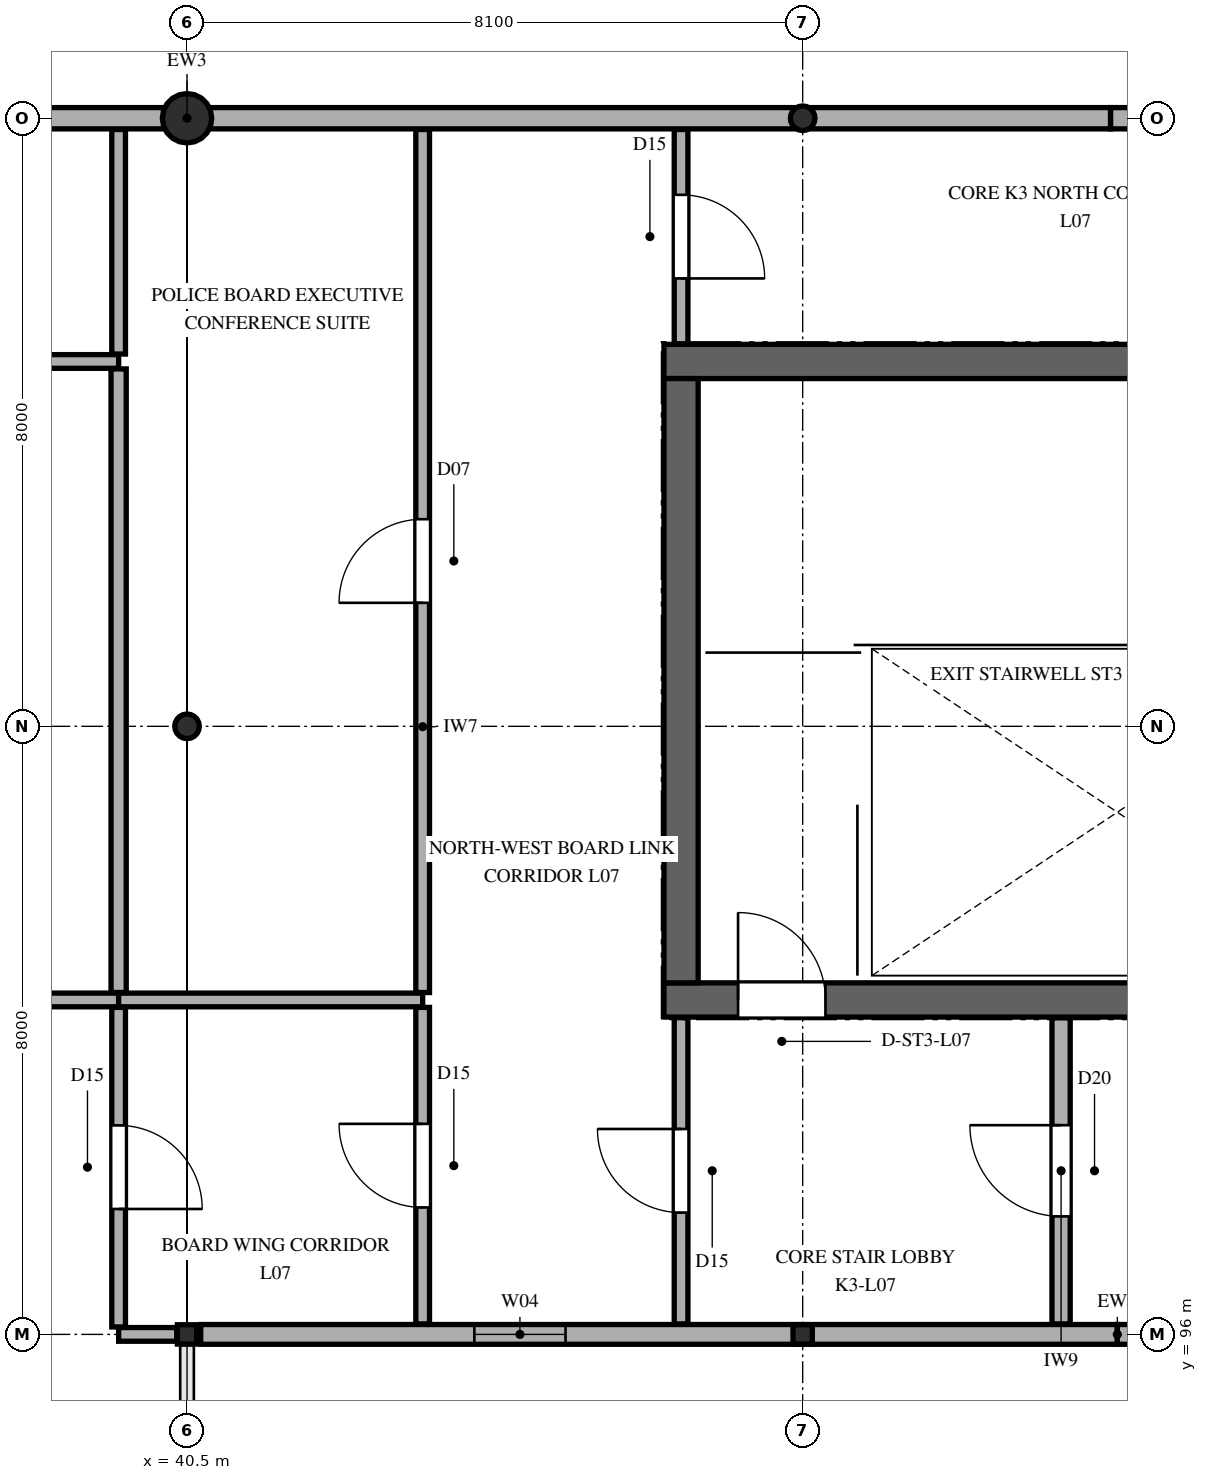
"""IFC4 building model, lengths in metres.
Left out: names, types, materials, properties, quantities, classifications, styles, units other than length and angle.
Written with IfcOpenShell. Run it as: python <this file> out.ifc"""

import sys

from ifc_helpers import new_model, si_unit, direction, frame, frame_2d, origin, origin_2d, place, context, subcontext, project, spatial, rectangle, hollow_rectangle, circle, hollow_circle, extrude, element, fill, save


model = new_model("IFC4")
c1 = context("Model", 3, precision=1e-05, world=origin(), true_north=direction((0.0, 1.0)))
c2 = subcontext(c1, "Body", "Model", "MODEL_VIEW")
j1 = project(units=[si_unit("LENGTHUNIT", "METRE"), si_unit("PLANEANGLEUNIT", "RADIAN")], contexts=[c1])
p1 = place(None, origin())
s1 = spatial("IfcSite", under=j1, at=p1, CompositionType="ELEMENT")
p2 = place(p1, origin())
s2 = spatial("IfcBuilding", under=s1, at=p2, CompositionType="ELEMENT")
p3 = place(p2, frame((0.0, 0.0, 33.3)))
s3 = spatial("IfcBuildingStorey", under=s2, at=p3, CompositionType="ELEMENT", Elevation=33.3)
p4 = place(p3, frame((46.775, 100.4, 0.0), z_axis=(0.0, 0.0, 1.0), x_axis=(1.0, 0.0, 0.0)))
e1 = element("IfcWall", 1, at=p4, inside=s3, PredefinedType="SHEAR", context=c2, shape_type="SweptSolid", body=[
    extrude(rectangle(XDim=15.25, YDim=0.45, at=frame_2d((7.625, 0.0))), origin(), (0.0, 0.0, 1.0), 3.98),
])
p5 = place(p4, frame((0.975, 0.0, 0.0)))
e2 = element("IfcOpeningElement", 2, at=p5, cuts=e1, PredefinedType="OPENING", context=c2, shape_type="SweptSolid", body=[
    extrude(rectangle(XDim=1.15, YDim=2.25, at=frame_2d((0.575, 1.125))), frame((0.0, 0.235, 0.0), z_axis=(0.0, -1.0, 0.0), x_axis=(1.0, 0.0, 0.0)), (0.0, 0.0, 1.0), 0.47),
])
p6 = place(p4, frame((10.258, 0.0, 0.0)))
e3 = element("IfcOpeningElement", 3, at=p6, cuts=e1, PredefinedType="OPENING", context=c2, shape_type="SweptSolid", body=[
    extrude(rectangle(XDim=1.1, YDim=2.2, at=frame_2d((0.55, 1.1))), frame((0.0, 0.235, 0.0), z_axis=(0.0, -1.0, 0.0), x_axis=(1.0, 0.0, 0.0)), (0.0, 0.0, 1.0), 0.47),
])
p7 = place(p3, frame((46.775, 108.8, 0.0), z_axis=(0.0, 0.0, 1.0), x_axis=(1.0, 0.0, 0.0)))
e4 = element("IfcWall", 4, at=p7, inside=s3, PredefinedType="SHEAR", context=c2, shape_type="SweptSolid", body=[
    extrude(rectangle(XDim=15.25, YDim=0.45, at=frame_2d((7.625, 0.0))), origin(), (0.0, 0.0, 1.0), 3.98),
])
p8 = place(p3, frame((47.0, 100.625, 0.0), z_axis=(0.0, 0.0, 1.0), x_axis=(0.0, 1.0, 0.0)))
e5 = element("IfcWall", 5, at=p8, inside=s3, PredefinedType="SHEAR", context=c2, shape_type="SweptSolid", body=[
    extrude(rectangle(XDim=7.95, YDim=0.45, at=frame_2d((3.975, 0.0))), origin(), (0.0, 0.0, 1.0), 3.98),
])
p9 = place(p3, frame((40.5, 96.0, 0.0), z_axis=(0.0, 0.0, 1.0), x_axis=(1.0, 0.0, 0.0)))
e6 = element("IfcColumn", 6, at=p9, inside=s3, PredefinedType="COLUMN", context=c2, shape_type="SweptSolid", body=[
    extrude(hollow_rectangle(XDim=0.254, YDim=0.254, WallThickness=0.013, InnerFilletRadius=0.013, OuterFilletRadius=0.025, at=origin_2d()), origin(), (0.0, 0.0, 1.0), 3.98),
])
p10 = place(p3, frame((40.5, 104.0, 0.0), z_axis=(0.0, 0.0, 1.0), x_axis=(1.0, 0.0, 0.0)))
e7 = element("IfcColumn", 7, at=p10, inside=s3, PredefinedType="COLUMN", context=c2, shape_type="SweptSolid", body=[
    extrude(hollow_circle(Radius=0.162, WallThickness=0.013, at=origin_2d()), origin(), (0.0, 0.0, 1.0), 3.98),
])
p11 = place(p3, frame((40.5, 112.0, 0.0), z_axis=(0.0, 0.0, 1.0), x_axis=(1.0, 0.0, 0.0)))
e8 = element("IfcColumn", 8, at=p11, inside=s3, PredefinedType="COLUMN", context=c2, shape_type="SweptSolid", body=[
    extrude(circle(Radius=0.325, at=origin_2d()), origin(), (0.0, 0.0, 1.0), 3.98),
])
p12 = place(p3, frame((48.6, 96.0, 0.0), z_axis=(0.0, 0.0, 1.0), x_axis=(1.0, 0.0, 0.0)))
e9 = element("IfcColumn", 9, at=p12, inside=s3, PredefinedType="COLUMN", context=c2, shape_type="SweptSolid", body=[
    extrude(hollow_rectangle(XDim=0.254, YDim=0.254, WallThickness=0.013, InnerFilletRadius=0.013, OuterFilletRadius=0.025, at=origin_2d()), origin(), (0.0, 0.0, 1.0), 3.98),
])
p13 = place(p3, frame((48.6, 112.0, 0.0), z_axis=(0.0, 0.0, 1.0), x_axis=(1.0, 0.0, 0.0)))
e10 = element("IfcColumn", 10, at=p13, inside=s3, PredefinedType="COLUMN", context=c2, shape_type="SweptSolid", body=[
    extrude(hollow_circle(Radius=0.162, WallThickness=0.013, at=origin_2d()), origin(), (0.0, 0.0, 1.0), 3.98),
])
p14 = place(p3, frame((40.68, 96.0, 0.0), z_axis=(0.0, 0.0, 1.0), x_axis=(1.0, 0.0, 0.0)))
e11 = element("IfcWall", 11, at=p14, inside=s3, PredefinedType="SOLIDWALL", context=c2, shape_type="SweptSolid", body=[
    extrude(rectangle(XDim=12.06, YDim=0.26, at=frame_2d((6.03, 0.0))), origin(), (0.0, 0.0, 1.0), 3.655),
])
p15 = place(p14, frame((3.6, 0.0, 0.95)))
e12 = element("IfcOpeningElement", 12, at=p15, cuts=e11, PredefinedType="OPENING", context=c2, shape_type="SweptSolid", body=[
    extrude(rectangle(XDim=1.2, YDim=1.8, at=frame_2d((0.6, 0.9))), frame((0.0, 0.14, 0.0), z_axis=(0.0, -1.0, 0.0), x_axis=(1.0, 0.0, 0.0)), (0.0, 0.0, 1.0), 0.28),
])
p16 = place(p3, frame((52.74, 96.0, 0.0), z_axis=(0.0, 0.0, 1.0), x_axis=(1.0, 0.0, 0.0)))
e13 = element("IfcWall", 13, at=p16, inside=s3, PredefinedType="SOLIDWALL", context=c2, shape_type="SweptSolid", body=[
    extrude(rectangle(XDim=12.06, YDim=0.26, at=frame_2d((6.03, 0.0))), origin(), (0.0, 0.0, 1.0), 3.655),
])
p17 = place(p3, frame((64.8, 112.0, 0.0), z_axis=(0.0, 0.0, 1.0), x_axis=(-1.0, 0.0, 0.0)))
e14 = element("IfcWall", 14, at=p17, inside=s3, PredefinedType="SOLIDWALL", context=c2, shape_type="SweptSolid", body=[
    extrude(rectangle(XDim=12.15, YDim=0.28, at=frame_2d((6.075, 0.0))), origin(), (0.0, 0.0, 1.0), 3.655),
])
p18 = place(p17, frame((5.4, 0.0, 0.95)))
e15 = element("IfcOpeningElement", 15, at=p18, cuts=e14, PredefinedType="OPENING", context=c2, shape_type="SweptSolid", body=[
    extrude(rectangle(XDim=1.35, YDim=1.8, at=frame_2d((0.675, 0.9))), frame((0.0, 0.15, 0.0), z_axis=(0.0, -1.0, 0.0), x_axis=(1.0, 0.0, 0.0)), (0.0, 0.0, 1.0), 0.3),
])
p19 = place(p3, frame((52.65, 112.0, 0.0), z_axis=(0.0, 0.0, 1.0), x_axis=(-1.0, 0.0, 0.0)))
e16 = element("IfcWall", 16, at=p19, inside=s3, PredefinedType="SOLIDWALL", context=c2, shape_type="SweptSolid", body=[
    extrude(rectangle(XDim=12.15, YDim=0.28, at=frame_2d((6.075, 0.0))), origin(), (0.0, 0.0, 1.0), 3.655),
])
p20 = place(p3, frame((40.5, 112.0, 0.0), z_axis=(0.0, 0.0, 1.0), x_axis=(-1.0, 0.0, 0.0)))
e17 = element("IfcWall", 17, at=p20, inside=s3, PredefinedType="SOLIDWALL", context=c2, shape_type="SweptSolid", body=[
    extrude(rectangle(XDim=12.15, YDim=0.28, at=frame_2d((6.075, 0.0))), origin(), (0.0, 0.0, 1.0), 3.655),
])
p21 = place(p20, frame((3.6, 0.0, 0.85)))
e18 = element("IfcOpeningElement", 18, at=p21, cuts=e17, PredefinedType="OPENING", context=c2, shape_type="SweptSolid", body=[
    extrude(rectangle(XDim=1.35, YDim=2.1, at=frame_2d((0.675, 1.05))), frame((0.0, 0.15, 0.0), z_axis=(0.0, -1.0, 0.0), x_axis=(1.0, 0.0, 0.0)), (0.0, 0.0, 1.0), 0.3),
])
p22 = place(p3, frame((34.4, 108.8, 0.0), z_axis=(0.0, 0.0, 1.0), x_axis=(1.0, 0.0, 0.0)))
e19 = element("IfcWall", 19, at=p22, inside=s3, PredefinedType="PARTITIONING", context=c2, shape_type="SweptSolid", body=[
    extrude(rectangle(XDim=5.2, YDim=0.18, at=frame_2d((2.6, 0.0))), origin(), (0.0, 0.0, 1.0), 3.98),
])
p23 = place(p22, frame((2.1, 0.0, 0.0)))
e20 = element("IfcOpeningElement", 20, at=p23, cuts=e19, PredefinedType="OPENING", context=c2, shape_type="SweptSolid", body=[
    extrude(rectangle(XDim=1.0, YDim=2.15, at=frame_2d((0.5, 1.075))), frame((0.0, 0.1, 0.0), z_axis=(0.0, -1.0, 0.0), x_axis=(1.0, 0.0, 0.0)), (0.0, 0.0, 1.0), 0.2),
])
p24 = place(p3, frame((37.2, 100.4, 0.0), z_axis=(0.0, 0.0, 1.0), x_axis=(1.0, 0.0, 0.0)))
e21 = element("IfcWall", 21, at=p24, inside=s3, PredefinedType="PARTITIONING", context=c2, shape_type="SweptSolid", body=[
    extrude(rectangle(XDim=2.4, YDim=0.18, at=frame_2d((1.2, 0.0))), origin(), (0.0, 0.0, 1.0), 3.98),
])
p25 = place(p3, frame((39.6, 96.0, 0.0), z_axis=(0.0, 0.0, 1.0), x_axis=(1.0, 0.0, 0.0)))
e22 = element("IfcWall", 22, at=p25, inside=s3, PredefinedType="PARTITIONING", context=c2, shape_type="SweptSolid", body=[
    extrude(rectangle(XDim=0.765, YDim=0.18, at=frame_2d((0.382, 0.0))), origin(), (0.0, 0.0, 1.0), 3.655),
])
p26 = place(p3, frame((39.6, 100.4, 0.0), z_axis=(0.0, 0.0, 1.0), x_axis=(1.0, 0.0, 0.0)))
e23 = element("IfcWall", 23, at=p26, inside=s3, PredefinedType="PARTITIONING", context=c2, shape_type="SweptSolid", body=[
    extrude(rectangle(XDim=4.0, YDim=0.18, at=frame_2d((2.0, 0.0))), origin(), (0.0, 0.0, 1.0), 3.98),
])
p27 = place(p3, frame((39.6, 96.098, 0.0), z_axis=(0.0, 0.0, 1.0), x_axis=(0.0, 1.0, 0.0)))
e24 = element("IfcWall", 24, at=p27, inside=s3, PredefinedType="PARTITIONING", context=c2, shape_type="SweptSolid", body=[
    extrude(rectangle(XDim=4.204, YDim=0.18, at=frame_2d((2.102, 0.0))), origin(), (0.0, 0.0, 1.0), 3.98),
])
p28 = place(p27, frame((1.552, 0.0, 0.0)))
e25 = element("IfcOpeningElement", 25, at=p28, cuts=e24, PredefinedType="OPENING", context=c2, shape_type="SweptSolid", body=[
    extrude(rectangle(XDim=1.1, YDim=2.2, at=frame_2d((0.55, 1.1))), frame((0.0, 0.1, 0.0), z_axis=(0.0, -1.0, 0.0), x_axis=(1.0, 0.0, 0.0)), (0.0, 0.0, 1.0), 0.2),
])
p29 = place(p3, frame((39.6, 100.498, 0.0), z_axis=(0.0, 0.0, 1.0), x_axis=(0.0, 1.0, 0.0)))
e26 = element("IfcWall", 26, at=p29, inside=s3, PredefinedType="PARTITIONING", context=c2, shape_type="SweptSolid", body=[
    extrude(rectangle(XDim=8.204, YDim=0.2, at=frame_2d((4.102, 0.0))), origin(), (0.0, 0.0, 1.0), 3.98),
])
p30 = place(p3, frame((39.6, 108.898, 0.0), z_axis=(0.0, 0.0, 1.0), x_axis=(0.0, 1.0, 0.0)))
e27 = element("IfcWall", 27, at=p30, inside=s3, PredefinedType="PARTITIONING", context=c2, shape_type="SweptSolid", body=[
    extrude(rectangle(XDim=2.954, YDim=0.18, at=frame_2d((1.477, 0.0))), origin(), (0.0, 0.0, 1.0), 3.98),
])
p31 = place(p3, frame((43.6, 96.138, 0.0), z_axis=(0.0, 0.0, 1.0), x_axis=(0.0, 1.0, 0.0)))
e28 = element("IfcWall", 28, at=p31, inside=s3, PredefinedType="PARTITIONING", context=c2, shape_type="SweptSolid", body=[
    extrude(rectangle(XDim=4.164, YDim=0.18, at=frame_2d((2.082, 0.0))), origin(), (0.0, 0.0, 1.0), 3.98),
])
p32 = place(p31, frame((1.532, 0.0, 0.0)))
e29 = element("IfcOpeningElement", 29, at=p32, cuts=e28, PredefinedType="OPENING", context=c2, shape_type="SweptSolid", body=[
    extrude(rectangle(XDim=1.1, YDim=2.2, at=frame_2d((0.55, 1.1))), frame((0.0, 0.1, 0.0), z_axis=(0.0, -1.0, 0.0), x_axis=(1.0, 0.0, 0.0)), (0.0, 0.0, 1.0), 0.2),
])
p33 = place(p3, frame((43.6, 100.498, 0.0), z_axis=(0.0, 0.0, 1.0), x_axis=(0.0, 1.0, 0.0)))
e30 = element("IfcWall", 30, at=p33, inside=s3, PredefinedType="PARTITIONING", context=c2, shape_type="SweptSolid", body=[
    extrude(rectangle(XDim=11.354, YDim=0.18, at=frame_2d((5.677, 0.0))), origin(), (0.0, 0.0, 1.0), 3.98),
])
p34 = place(p33, frame((5.127, 0.0, 0.0)))
e31 = element("IfcOpeningElement", 31, at=p34, cuts=e30, PredefinedType="OPENING", context=c2, shape_type="SweptSolid", body=[
    extrude(rectangle(XDim=1.1, YDim=2.2, at=frame_2d((0.55, 1.1))), frame((0.0, 0.1, 0.0), z_axis=(0.0, -1.0, 0.0), x_axis=(1.0, 0.0, 0.0)), (0.0, 0.0, 1.0), 0.2),
])
p35 = place(p3, frame((47.0, 96.138, 0.0), z_axis=(0.0, 0.0, 1.0), x_axis=(0.0, 1.0, 0.0)))
e32 = element("IfcWall", 32, at=p35, inside=s3, PredefinedType="PARTITIONING", context=c2, shape_type="SweptSolid", body=[
    extrude(rectangle(XDim=4.029, YDim=0.18, at=frame_2d((2.015, 0.0))), origin(), (0.0, 0.0, 1.0), 3.98),
])
p36 = place(p35, frame((1.465, 0.0, 0.0)))
e33 = element("IfcOpeningElement", 33, at=p36, cuts=e32, PredefinedType="OPENING", context=c2, shape_type="SweptSolid", body=[
    extrude(rectangle(XDim=1.1, YDim=2.2, at=frame_2d((0.55, 1.1))), frame((0.0, 0.1, 0.0), z_axis=(0.0, -1.0, 0.0), x_axis=(1.0, 0.0, 0.0)), (0.0, 0.0, 1.0), 0.2),
])
p37 = place(p3, frame((47.0, 109.033, 0.0), z_axis=(0.0, 0.0, 1.0), x_axis=(0.0, 1.0, 0.0)))
e34 = element("IfcWall", 34, at=p37, inside=s3, PredefinedType="PARTITIONING", context=c2, shape_type="SweptSolid", body=[
    extrude(rectangle(XDim=2.819, YDim=0.18, at=frame_2d((1.41, 0.0))), origin(), (0.0, 0.0, 1.0), 3.98),
])
p38 = place(p37, frame((0.86, 0.0, 0.0)))
e35 = element("IfcOpeningElement", 35, at=p38, cuts=e34, PredefinedType="OPENING", context=c2, shape_type="SweptSolid", body=[
    extrude(rectangle(XDim=1.1, YDim=2.2, at=frame_2d((0.55, 1.1))), frame((0.0, 0.1, 0.0), z_axis=(0.0, -1.0, 0.0), x_axis=(1.0, 0.0, 0.0)), (0.0, 0.0, 1.0), 0.2),
])
p39 = place(p3, frame((52.0, 96.138, 0.0), z_axis=(0.0, 0.0, 1.0), x_axis=(0.0, 1.0, 0.0)))
e36 = element("IfcWall", 36, at=p39, inside=s3, PredefinedType="PARTITIONING", context=c2, shape_type="SweptSolid", body=[
    extrude(rectangle(XDim=4.029, YDim=0.24, at=frame_2d((2.015, 0.0))), origin(), (0.0, 0.0, 1.0), 3.98),
])
p40 = place(p39, frame((1.415, 0.0, 0.0)))
e37 = element("IfcOpeningElement", 37, at=p40, cuts=e36, PredefinedType="OPENING", context=c2, shape_type="SweptSolid", body=[
    extrude(rectangle(XDim=1.2, YDim=2.3, at=frame_2d((0.6, 1.15))), frame((0.0, 0.13, 0.0), z_axis=(0.0, -1.0, 0.0), x_axis=(1.0, 0.0, 0.0)), (0.0, 0.0, 1.0), 0.26),
])
p41 = place(p15, origin())
e38 = element("IfcWindow", 38, at=p41, inside=s3, PartitioningType="SINGLE_PANEL", PredefinedType="WINDOW", context=c2, shape_type="SweptSolid", body=[
    extrude(rectangle(XDim=1.2, YDim=1.8, at=frame_2d((0.6, 0.9))), frame((0.0, 0.03, 0.0), z_axis=(0.0, -1.0, 0.0), x_axis=(1.0, 0.0, 0.0)), (0.0, 0.0, 1.0), 0.06),
])
fill(e12, e38)
p42 = place(p5, origin())
e39 = element("IfcDoor", 39, at=p42, inside=s3, OperationType="SINGLE_SWING_LEFT", PredefinedType="DOOR", context=c2, shape_type="SweptSolid", body=[
    extrude(rectangle(XDim=1.15, YDim=2.25, at=frame_2d((0.575, 1.125))), frame((0.0, 0.025, 0.0), z_axis=(0.0, -1.0, 0.0), x_axis=(1.0, 0.0, 0.0)), (0.0, 0.0, 1.0), 0.05),
])
fill(e2, e39)
p43 = place(p28, frame((1.1, 0.0, 0.0), z_axis=(0.0, 0.0, 1.0), x_axis=(-1.0, 0.0, 0.0)))
e40 = element("IfcDoor", 40, at=p43, inside=s3, OperationType="SINGLE_SWING_LEFT", PredefinedType="DOOR", context=c2, shape_type="SweptSolid", body=[
    extrude(rectangle(XDim=1.1, YDim=2.2, at=frame_2d((0.55, 1.1))), frame((0.0, 0.025, 0.0), z_axis=(0.0, -1.0, 0.0), x_axis=(1.0, 0.0, 0.0)), (0.0, 0.0, 1.0), 0.05),
])
fill(e25, e40)
p44 = place(p32, origin())
e41 = element("IfcDoor", 41, at=p44, inside=s3, OperationType="SINGLE_SWING_RIGHT", PredefinedType="DOOR", context=c2, shape_type="SweptSolid", body=[
    extrude(rectangle(XDim=1.1, YDim=2.2, at=frame_2d((0.55, 1.1))), frame((0.0, 0.025, 0.0), z_axis=(0.0, -1.0, 0.0), x_axis=(1.0, 0.0, 0.0)), (0.0, 0.0, 1.0), 0.05),
])
fill(e29, e41)
p45 = place(p34, origin())
e42 = element("IfcDoor", 42, at=p45, inside=s3, OperationType="SINGLE_SWING_LEFT", PredefinedType="DOOR", context=c2, shape_type="SweptSolid", body=[
    extrude(rectangle(XDim=1.1, YDim=2.2, at=frame_2d((0.55, 1.1))), frame((0.0, 0.025, 0.0), z_axis=(0.0, -1.0, 0.0), x_axis=(1.0, 0.0, 0.0)), (0.0, 0.0, 1.0), 0.05),
])
fill(e31, e42)
p46 = place(p36, origin())
e43 = element("IfcDoor", 43, at=p46, inside=s3, OperationType="SINGLE_SWING_RIGHT", PredefinedType="DOOR", context=c2, shape_type="SweptSolid", body=[
    extrude(rectangle(XDim=1.1, YDim=2.2, at=frame_2d((0.55, 1.1))), frame((0.0, 0.025, 0.0), z_axis=(0.0, -1.0, 0.0), x_axis=(1.0, 0.0, 0.0)), (0.0, 0.0, 1.0), 0.05),
])
fill(e33, e43)
p47 = place(p38, frame((1.1, 0.0, 0.0), z_axis=(0.0, 0.0, 1.0), x_axis=(-1.0, 0.0, 0.0)))
e44 = element("IfcDoor", 44, at=p47, inside=s3, OperationType="SINGLE_SWING_LEFT", PredefinedType="DOOR", context=c2, shape_type="SweptSolid", body=[
    extrude(rectangle(XDim=1.1, YDim=2.2, at=frame_2d((0.55, 1.1))), frame((0.0, 0.025, 0.0), z_axis=(0.0, -1.0, 0.0), x_axis=(1.0, 0.0, 0.0)), (0.0, 0.0, 1.0), 0.05),
])
fill(e35, e44)
p48 = place(p40, origin())
e45 = element("IfcDoor", 45, at=p48, inside=s3, OperationType="SINGLE_SWING_RIGHT", PredefinedType="DOOR", context=c2, shape_type="SweptSolid", body=[
    extrude(rectangle(XDim=1.2, YDim=2.3, at=frame_2d((0.6, 1.15))), frame((0.0, 0.025, 0.0), z_axis=(0.0, -1.0, 0.0), x_axis=(1.0, 0.0, 0.0)), (0.0, 0.0, 1.0), 0.05),
])
fill(e37, e45)
save(model, sys.argv[1])
